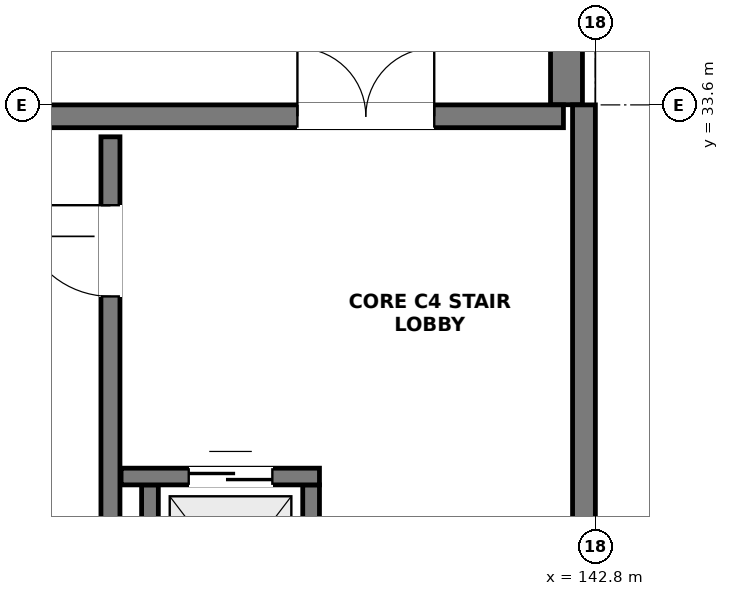
"""IFC4 building model, lengths in metres.
Left out: names, types, materials, properties, quantities, classifications, styles, units other than length and angle.
Written with IfcOpenShell. Run it as: python <this file> out.ifc"""

import sys

from ifc_helpers import new_model, si_unit, direction, frame, frame_2d, origin, place, context, subcontext, project, spatial, rectangle, extrude, element, fill, save


model = new_model("IFC4")
c1 = context("Model", 3, precision=1e-05, world=origin(), true_north=direction((0.0, 1.0)))
c2 = subcontext(c1, "Body", "Model", "MODEL_VIEW")
j1 = project(units=[si_unit("LENGTHUNIT", "METRE"), si_unit("PLANEANGLEUNIT", "RADIAN")], contexts=[c1])
p1 = place(None, origin())
s1 = spatial("IfcSite", under=j1, at=p1, CompositionType="ELEMENT")
p2 = place(p1, origin())
s2 = spatial("IfcBuilding", under=s1, at=p2, CompositionType="ELEMENT")
p3 = place(p2, frame((0.0, 0.0, -4.8)))
s3 = spatial("IfcBuildingStorey", under=s2, at=p3, CompositionType="ELEMENT", Elevation=-4.8)
p4 = place(p3, frame((142.42, 41.761, 0.0), z_axis=(0.0, 0.0, 1.0), x_axis=(0.0, -1.0, 0.0)))
e1 = element("IfcWall", 1, at=p4, inside=s3, PredefinedType="USERDEFINED", context=c2, shape_type="SweptSolid", body=[
    extrude(rectangle(XDim=8.159, YDim=0.42, at=frame_2d((4.08, 0.0))), origin(), (0.0, 0.0, 1.0), 3.85),
])
p5 = place(p3, frame((126.45, 33.45, 0.0), z_axis=(0.0, 0.0, 1.0), x_axis=(1.0, 0.0, 0.0)))
e2 = element("IfcWall", 2, at=p5, inside=s3, PredefinedType="SHEAR", context=c2, shape_type="SweptSolid", body=[
    extrude(rectangle(XDim=15.93, YDim=0.3, at=frame_2d((7.965, 0.0))), origin(), (0.0, 0.0, 1.0), 4.5),
])
p6 = place(p5, frame((12.43, 0.0, 0.0)))
e3 = element("IfcOpeningElement", 3, at=p6, cuts=e2, PredefinedType="OPENING", context=c2, shape_type="SweptSolid", body=[
    extrude(rectangle(XDim=1.8, YDim=2.2, at=frame_2d((0.9, 1.1))), frame((0.0, 0.162, 0.0), z_axis=(0.0, -1.0, 0.0), x_axis=(1.0, 0.0, 0.0)), (0.0, 0.0, 1.0), 0.324),
])
p7 = place(p3, frame((142.65, 25.62, 0.0), z_axis=(0.0, 0.0, 1.0), x_axis=(0.0, 1.0, 0.0)))
e4 = element("IfcWall", 4, at=p7, inside=s3, PredefinedType="SHEAR", context=c2, shape_type="SweptSolid", body=[
    extrude(rectangle(XDim=7.98, YDim=0.3, at=frame_2d((3.99, 0.0))), origin(), (0.0, 0.0, 1.0), 4.5),
])
p8 = place(p3, frame((136.42, 25.62, 0.0), z_axis=(0.0, 0.0, 1.0), x_axis=(0.0, 1.0, 0.0)))
e5 = element("IfcWall", 5, at=p8, inside=s3, PredefinedType="SHEAR", context=c2, shape_type="SweptSolid", body=[
    extrude(rectangle(XDim=7.56, YDim=0.25, at=frame_2d((3.78, 0.0))), origin(), (0.0, 0.0, 1.0), 4.5),
])
p9 = place(p8, frame((5.46, 0.0, 0.0)))
e6 = element("IfcOpeningElement", 6, at=p9, cuts=e5, PredefinedType="OPENING", context=c2, shape_type="SweptSolid", body=[
    extrude(rectangle(XDim=1.2, YDim=2.2, at=frame_2d((0.6, 1.1))), frame((0.0, 0.137, 0.0), z_axis=(0.0, -1.0, 0.0), x_axis=(1.0, 0.0, 0.0)), (0.0, 0.0, 1.0), 0.274),
])
for number, where, z_axis, x_axis in (
    (7, (136.94, 26.2, 0.0), (0.0, 0.0, 1.0), (0.0, 1.0, 0.0)),
    (8, (139.06, 26.2, 0.0), (0.0, 0.0, 1.0), (0.0, 1.0, 0.0)),
):
    element("IfcWall", number, at=place(p3, frame(where, z_axis=z_axis, x_axis=x_axis)), inside=s3, PredefinedType="SOLIDWALL", context=c2, shape_type="SweptSolid", body=[
        extrude(rectangle(XDim=2.4, YDim=0.22, at=frame_2d((1.2, 0.0))), origin(), (0.0, 0.0, 1.0), 4.5),
    ])
p10 = place(p3, frame((136.56, 28.71, 0.0), z_axis=(0.0, 0.0, 1.0), x_axis=(1.0, 0.0, 0.0)))
e9 = element("IfcWall", 9, at=p10, inside=s3, PredefinedType="SOLIDWALL", context=c2, shape_type="SweptSolid", body=[
    extrude(rectangle(XDim=2.61, YDim=0.22, at=frame_2d((1.305, 0.0))), origin(), (0.0, 0.0, 1.0), 4.5),
])
p11 = place(p10, frame((0.89, 0.0, 0.0)))
e10 = element("IfcOpeningElement", 10, at=p11, cuts=e9, PredefinedType="OPENING", context=c2, shape_type="SweptSolid", body=[
    extrude(rectangle(XDim=1.1, YDim=2.15, at=frame_2d((0.55, 1.075))), frame((0.0, 0.122, 0.0), z_axis=(0.0, -1.0, 0.0), x_axis=(1.0, 0.0, 0.0)), (0.0, 0.0, 1.0), 0.244),
])
p12 = place(p6, origin())
e11 = element("IfcDoor", 11, at=p12, inside=s3, OperationType="DOUBLE_DOOR_SINGLE_SWING", PredefinedType="DOOR", context=c2, shape_type="SweptSolid", body=[
    extrude(rectangle(XDim=1.8, YDim=2.2, at=frame_2d((0.9, 1.1))), frame((0.0, 0.025, 0.0), z_axis=(0.0, -1.0, 0.0), x_axis=(1.0, 0.0, 0.0)), (0.0, 0.0, 1.0), 0.05),
])
fill(e3, e11)
p13 = place(p9, origin())
e12 = element("IfcDoor", 12, at=p13, inside=s3, OperationType="SINGLE_SWING_RIGHT", PredefinedType="DOOR", context=c2, shape_type="SweptSolid", body=[
    extrude(rectangle(XDim=1.2, YDim=2.2, at=frame_2d((0.6, 1.1))), frame((0.0, 0.025, 0.0), z_axis=(0.0, -1.0, 0.0), x_axis=(1.0, 0.0, 0.0)), (0.0, 0.0, 1.0), 0.05),
])
fill(e6, e12)
p14 = place(p11, origin())
e13 = element("IfcDoor", 13, at=p14, inside=s3, OperationType="DOUBLE_DOOR_SLIDING", PredefinedType="DOOR", context=c2, shape_type="SweptSolid", body=[
    extrude(rectangle(XDim=1.1, YDim=2.15, at=frame_2d((0.55, 1.075))), frame((0.0, 0.025, 0.0), z_axis=(0.0, -1.0, 0.0), x_axis=(1.0, 0.0, 0.0)), (0.0, 0.0, 1.0), 0.05),
])
fill(e10, e13)
save(model, sys.argv[1])
